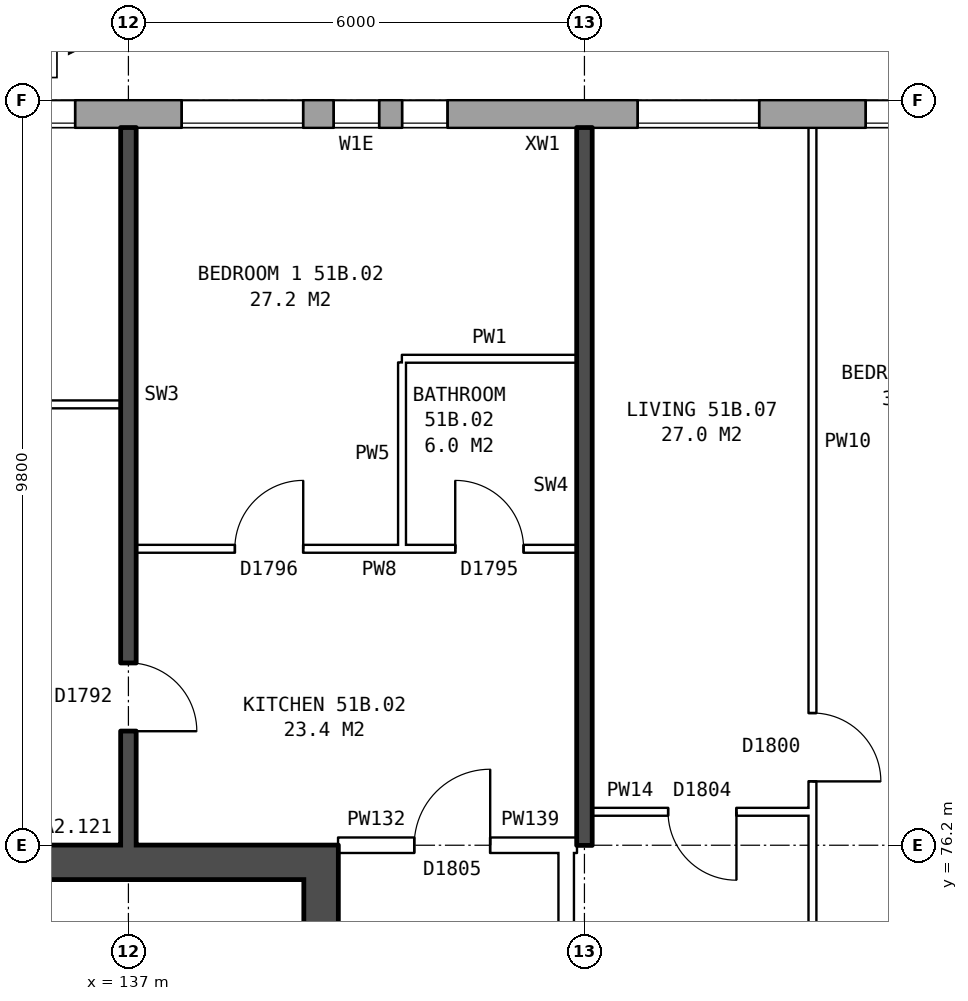
"""IFC4 building model, lengths in metres.
Left out: names, types, materials, properties, quantities, classifications, styles, units other than length and angle.
Written with IfcOpenShell. Run it as: python <this file> out.ifc"""

import sys

from ifc_helpers import new_model, si_unit, direction, frame, frame_2d, origin, place, context, subcontext, project, spatial, rectangle, extrude, element, fill, save


model = new_model("IFC4")
c1 = context("Model", 3, precision=1e-05, world=origin(), true_north=direction((0.0, 1.0)))
c2 = subcontext(c1, "Body", "Model", "MODEL_VIEW")
j1 = project(units=[si_unit("LENGTHUNIT", "METRE"), si_unit("PLANEANGLEUNIT", "RADIAN")], contexts=[c1])
p1 = place(None, origin())
s1 = spatial("IfcSite", under=j1, at=p1, CompositionType="ELEMENT")
p2 = place(p1, origin())
s2 = spatial("IfcBuilding", under=s1, at=p2, CompositionType="ELEMENT")
p3 = place(p2, frame((0.0, 0.0, 182.0)))
s3 = spatial("IfcBuildingStorey", under=s2, at=p3, CompositionType="ELEMENT", Elevation=182.0)
p4 = place(p3, frame((167.175, 85.82, 0.0), z_axis=(0.0, 0.0, 1.0), x_axis=(-1.0, 0.0, 0.0)))
e1 = element("IfcWall", 1, at=p4, inside=s3, PredefinedType="STANDARD", context=c2, shape_type="SweptSolid", body=[
    extrude(rectangle(XDim=33.101, YDim=0.36, at=frame_2d((16.55, 0.0))), origin(), (0.0, 0.0, 1.0), 2.85),
])
p5 = place(p4, frame((0.875, 0.0, 0.8)))
e2 = element("IfcOpeningElement", 2, at=p5, cuts=e1, PredefinedType="OPENING", context=c2, shape_type="SweptSolid", body=[
    extrude(rectangle(XDim=1.6, YDim=1.8, at=frame_2d((0.8, 0.9))), frame((0.0, 0.19, 0.0), z_axis=(0.0, -1.0, 0.0), x_axis=(1.0, 0.0, 0.0)), (0.0, 0.0, 1.0), 0.38),
])
p6 = place(p4, frame((3.875, 0.0, 0.8)))
e3 = element("IfcOpeningElement", 3, at=p6, cuts=e1, PredefinedType="OPENING", context=c2, shape_type="SweptSolid", body=[
    extrude(rectangle(XDim=1.6, YDim=1.8, at=frame_2d((0.8, 0.9))), frame((0.0, 0.19, 0.0), z_axis=(0.0, -1.0, 0.0), x_axis=(1.0, 0.0, 0.0)), (0.0, 0.0, 1.0), 0.38),
])
p7 = place(p4, frame((6.375, 0.0, 1.5)))
e4 = element("IfcOpeningElement", 4, at=p7, cuts=e1, PredefinedType="OPENING", context=c2, shape_type="SweptSolid", body=[
    extrude(rectangle(XDim=0.6, YDim=0.9, at=frame_2d((0.3, 0.45))), frame((0.0, 0.19, 0.0), z_axis=(0.0, -1.0, 0.0), x_axis=(1.0, 0.0, 0.0)), (0.0, 0.0, 1.0), 0.38),
])
p8 = place(p4, frame((9.875, 0.0, 0.8)))
e5 = element("IfcOpeningElement", 5, at=p8, cuts=e1, PredefinedType="OPENING", context=c2, shape_type="SweptSolid", body=[
    extrude(rectangle(XDim=1.6, YDim=1.8, at=frame_2d((0.8, 0.9))), frame((0.0, 0.19, 0.0), z_axis=(0.0, -1.0, 0.0), x_axis=(1.0, 0.0, 0.0)), (0.0, 0.0, 1.0), 0.38),
])
p9 = place(p4, frame((12.875, 0.0, 0.8)))
e6 = element("IfcOpeningElement", 6, at=p9, cuts=e1, PredefinedType="OPENING", context=c2, shape_type="SweptSolid", body=[
    extrude(rectangle(XDim=1.6, YDim=1.8, at=frame_2d((0.8, 0.9))), frame((0.0, 0.19, 0.0), z_axis=(0.0, -1.0, 0.0), x_axis=(1.0, 0.0, 0.0)), (0.0, 0.0, 1.0), 0.38),
])
p10 = place(p4, frame((15.875, 0.0, 0.8)))
e7 = element("IfcOpeningElement", 7, at=p10, cuts=e1, PredefinedType="OPENING", context=c2, shape_type="SweptSolid", body=[
    extrude(rectangle(XDim=1.6, YDim=1.8, at=frame_2d((0.8, 0.9))), frame((0.0, 0.19, 0.0), z_axis=(0.0, -1.0, 0.0), x_axis=(1.0, 0.0, 0.0)), (0.0, 0.0, 1.0), 0.38),
])
p11 = place(p4, frame((18.875, 0.0, 0.8)))
e8 = element("IfcOpeningElement", 8, at=p11, cuts=e1, PredefinedType="OPENING", context=c2, shape_type="SweptSolid", body=[
    extrude(rectangle(XDim=1.6, YDim=1.8, at=frame_2d((0.8, 0.9))), frame((0.0, 0.19, 0.0), z_axis=(0.0, -1.0, 0.0), x_axis=(1.0, 0.0, 0.0)), (0.0, 0.0, 1.0), 0.38),
])
p12 = place(p4, frame((21.875, 0.0, 0.8)))
e9 = element("IfcOpeningElement", 9, at=p12, cuts=e1, PredefinedType="OPENING", context=c2, shape_type="SweptSolid", body=[
    extrude(rectangle(XDim=1.6, YDim=1.8, at=frame_2d((0.8, 0.9))), frame((0.0, 0.19, 0.0), z_axis=(0.0, -1.0, 0.0), x_axis=(1.0, 0.0, 0.0)), (0.0, 0.0, 1.0), 0.38),
])
p13 = place(p4, frame((25.975, 0.0, 1.7)))
e10 = element("IfcOpeningElement", 10, at=p13, cuts=e1, PredefinedType="OPENING", context=c2, shape_type="SweptSolid", body=[
    extrude(rectangle(XDim=0.6, YDim=0.9, at=frame_2d((0.3, 0.45))), frame((0.0, 0.19, 0.0), z_axis=(0.0, -1.0, 0.0), x_axis=(1.0, 0.0, 0.0)), (0.0, 0.0, 1.0), 0.38),
])
p14 = place(p4, frame((27.875, 0.0, 0.8)))
e11 = element("IfcOpeningElement", 11, at=p14, cuts=e1, PredefinedType="OPENING", context=c2, shape_type="SweptSolid", body=[
    extrude(rectangle(XDim=1.6, YDim=1.8, at=frame_2d((0.8, 0.9))), frame((0.0, 0.19, 0.0), z_axis=(0.0, -1.0, 0.0), x_axis=(1.0, 0.0, 0.0)), (0.0, 0.0, 1.0), 0.38),
])
p15 = place(p4, frame((30.875, 0.0, 0.8)))
e12 = element("IfcOpeningElement", 12, at=p15, cuts=e1, PredefinedType="OPENING", context=c2, shape_type="SweptSolid", body=[
    extrude(rectangle(XDim=1.6, YDim=1.8, at=frame_2d((0.8, 0.9))), frame((0.0, 0.19, 0.0), z_axis=(0.0, -1.0, 0.0), x_axis=(1.0, 0.0, 0.0)), (0.0, 0.0, 1.0), 0.38),
])
p16 = place(p4, frame((8.175, 0.0, 0.8)))
e13 = element("IfcOpeningElement", 13, at=p16, cuts=e1, PredefinedType="OPENING", context=c2, shape_type="SweptSolid", body=[
    extrude(rectangle(XDim=1.4, YDim=0.9, at=frame_2d((0.7, 0.45))), frame((0.0, 0.19, 0.0), z_axis=(0.0, -1.0, 0.0), x_axis=(1.0, 0.0, 0.0)), (0.0, 0.0, 1.0), 0.38),
])
p17 = place(p4, frame((26.875, 0.0, 0.8)))
e14 = element("IfcOpeningElement", 14, at=p17, cuts=e1, PredefinedType="OPENING", context=c2, shape_type="SweptSolid", body=[
    extrude(rectangle(XDim=0.6, YDim=1.8, at=frame_2d((0.3, 0.9))), frame((0.0, 0.19, 0.0), z_axis=(0.0, -1.0, 0.0), x_axis=(1.0, 0.0, 0.0)), (0.0, 0.0, 1.0), 0.38),
])
p18 = place(p3, frame((139.535, 63.8, 0.0), z_axis=(0.0, 0.0, 1.0), x_axis=(0.0, 1.0, 0.0)))
e15 = element("IfcWall", 15, at=p18, inside=s3, PredefinedType="SHEAR", context=c2, shape_type="SweptSolid", body=[
    extrude(rectangle(XDim=12.4, YDim=0.45, at=frame_2d((6.2, 0.0))), origin(), (0.0, 0.0, 1.0), 2.85),
])
p19 = place(p18, frame((1.325, 0.0, 0.0)))
e16 = element("IfcOpeningElement", 16, at=p19, cuts=e15, PredefinedType="OPENING", context=c2, shape_type="SweptSolid", body=[
    extrude(rectangle(XDim=1.1, YDim=2.1, at=frame_2d((0.55, 1.05))), frame((0.0, 0.235, 0.0), z_axis=(0.0, -1.0, 0.0), x_axis=(1.0, 0.0, 0.0)), (0.0, 0.0, 1.0), 0.47),
])
p20 = place(p18, frame((3.6, 0.0, 0.0)))
e17 = element("IfcOpeningElement", 17, at=p20, cuts=e15, PredefinedType="OPENING", context=c2, shape_type="SweptSolid", body=[
    extrude(rectangle(XDim=1.1, YDim=2.1, at=frame_2d((0.55, 1.05))), frame((0.0, 0.235, 0.0), z_axis=(0.0, -1.0, 0.0), x_axis=(1.0, 0.0, 0.0)), (0.0, 0.0, 1.0), 0.47),
])
p21 = place(p18, frame((5.8, 0.0, 0.0)))
e18 = element("IfcOpeningElement", 18, at=p21, cuts=e15, PredefinedType="OPENING", context=c2, shape_type="SweptSolid", body=[
    extrude(rectangle(XDim=1.1, YDim=2.1, at=frame_2d((0.55, 1.05))), frame((0.0, 0.235, 0.0), z_axis=(0.0, -1.0, 0.0), x_axis=(1.0, 0.0, 0.0)), (0.0, 0.0, 1.0), 0.47),
])
p22 = place(p18, frame((9.9, 0.0, 0.0)))
e19 = element("IfcOpeningElement", 19, at=p22, cuts=e15, PredefinedType="OPENING", context=c2, shape_type="SweptSolid", body=[
    extrude(rectangle(XDim=1.1, YDim=2.1, at=frame_2d((0.55, 1.05))), frame((0.0, 0.235, 0.0), z_axis=(0.0, -1.0, 0.0), x_axis=(1.0, 0.0, 0.0)), (0.0, 0.0, 1.0), 0.47),
])
p23 = place(p18, frame((8.125, 0.0, 0.0)))
e20 = element("IfcOpeningElement", 20, at=p23, cuts=e15, PredefinedType="OPENING", context=c2, shape_type="SweptSolid", body=[
    extrude(rectangle(XDim=0.85, YDim=2.1, at=frame_2d((0.425, 1.05))), frame((0.0, 0.235, 0.0), z_axis=(0.0, -1.0, 0.0), x_axis=(1.0, 0.0, 0.0)), (0.0, 0.0, 1.0), 0.47),
])
p24 = place(p3, frame((139.31, 75.975, 0.0), z_axis=(0.0, 0.0, 1.0), x_axis=(-1.0, 0.0, 0.0)))
e21 = element("IfcWall", 21, at=p24, inside=s3, PredefinedType="SHEAR", context=c2, shape_type="SweptSolid", body=[
    extrude(rectangle(XDim=7.5, YDim=0.45, at=frame_2d((3.75, 0.0))), origin(), (0.0, 0.0, 1.0), 2.85),
])
p25 = place(p3, frame((142.76, 63.9, 0.0), z_axis=(0.0, 0.0, 1.0), x_axis=(0.0, 1.0, 0.0)))
e22 = element("IfcWall", 22, at=p25, inside=s3, PredefinedType="PARTITIONING", context=c2, shape_type="SweptSolid", body=[
    extrude(rectangle(XDim=12.2, YDim=0.2, at=frame_2d((6.1, 0.0))), origin(), (0.0, 0.0, 1.0), 2.85),
])
p26 = place(p25, frame((5.1, 0.0, 0.0)))
e23 = element("IfcOpeningElement", 23, at=p26, cuts=e22, PredefinedType="OPENING", context=c2, shape_type="SweptSolid", body=[
    extrude(rectangle(XDim=2.0, YDim=2.1, at=frame_2d((1.0, 1.05))), frame((0.0, 0.11, 0.0), z_axis=(0.0, -1.0, 0.0), x_axis=(1.0, 0.0, 0.0)), (0.0, 0.0, 1.0), 0.22),
])
p27 = place(p3, frame((139.76, 76.2, 0.0), z_axis=(0.0, 0.0, 1.0), x_axis=(1.0, 0.0, 0.0)))
e24 = element("IfcWall", 24, at=p27, inside=s3, PredefinedType="PARTITIONING", context=c2, shape_type="SweptSolid", body=[
    extrude(rectangle(XDim=3.0, YDim=0.2, at=frame_2d((1.5, 0.0))), origin(), (0.0, 0.0, 1.0), 2.85),
])
p28 = place(p27, frame((1.0, 0.0, 0.0)))
e25 = element("IfcOpeningElement", 25, at=p28, cuts=e24, PredefinedType="OPENING", context=c2, shape_type="SweptSolid", body=[
    extrude(rectangle(XDim=1.0, YDim=2.1, at=frame_2d((0.5, 1.05))), frame((0.0, 0.11, 0.0), z_axis=(0.0, -1.0, 0.0), x_axis=(1.0, 0.0, 0.0)), (0.0, 0.0, 1.0), 0.22),
])
p29 = place(p3, frame((142.76, 76.2, 0.0), z_axis=(0.0, 0.0, 1.0), x_axis=(1.0, 0.0, 0.0)))
e26 = element("IfcWall", 26, at=p29, inside=s3, PredefinedType="PARTITIONING", context=c2, shape_type="SweptSolid", body=[
    extrude(rectangle(XDim=0.14, YDim=0.2, at=frame_2d((0.07, 0.0))), origin(), (0.0, 0.0, 1.0), 2.85),
])
p30 = place(p3, frame((143.1, 76.64, 0.0), z_axis=(0.0, 0.0, 1.0), x_axis=(1.0, 0.0, 0.0)))
e27 = element("IfcWall", 27, at=p30, inside=s3, PredefinedType="PARTITIONING", context=c2, shape_type="SweptSolid", body=[
    extrude(rectangle(XDim=2.9, YDim=0.1, at=frame_2d((1.45, 0.0))), origin(), (0.0, 0.0, 1.0), 2.85),
])
p31 = place(p30, frame((1.0, 0.0, 0.0)))
e28 = element("IfcOpeningElement", 28, at=p31, cuts=e27, PredefinedType="OPENING", context=c2, shape_type="SweptSolid", body=[
    extrude(rectangle(XDim=0.9, YDim=2.1, at=frame_2d((0.45, 1.05))), frame((0.0, 0.06, 0.0), z_axis=(0.0, -1.0, 0.0), x_axis=(1.0, 0.0, 0.0)), (0.0, 0.0, 1.0), 0.12),
])
p32 = place(p3, frame((137.1, 80.1, 0.0), z_axis=(0.0, 0.0, 1.0), x_axis=(1.0, 0.0, 0.0)))
e29 = element("IfcWall", 29, at=p32, inside=s3, PredefinedType="PARTITIONING", context=c2, shape_type="SweptSolid", body=[
    extrude(rectangle(XDim=5.8, YDim=0.1, at=frame_2d((2.9, 0.0))), origin(), (0.0, 0.0, 1.0), 2.85),
])
p33 = place(p32, frame((1.3, 0.0, 0.0)))
e30 = element("IfcOpeningElement", 30, at=p33, cuts=e29, PredefinedType="OPENING", context=c2, shape_type="SweptSolid", body=[
    extrude(rectangle(XDim=0.9, YDim=2.1, at=frame_2d((0.45, 1.05))), frame((0.0, 0.06, 0.0), z_axis=(0.0, -1.0, 0.0), x_axis=(1.0, 0.0, 0.0)), (0.0, 0.0, 1.0), 0.12),
])
p34 = place(p32, frame((4.2, 0.0, 0.0)))
e31 = element("IfcOpeningElement", 31, at=p34, cuts=e29, PredefinedType="OPENING", context=c2, shape_type="SweptSolid", body=[
    extrude(rectangle(XDim=0.9, YDim=2.1, at=frame_2d((0.45, 1.05))), frame((0.0, 0.06, 0.0), z_axis=(0.0, -1.0, 0.0), x_axis=(1.0, 0.0, 0.0)), (0.0, 0.0, 1.0), 0.12),
])
p35 = place(p3, frame((131.36, 82.0, 0.0), z_axis=(0.0, 0.0, 1.0), x_axis=(1.0, 0.0, 0.0)))
e32 = element("IfcWall", 32, at=p35, inside=s3, PredefinedType="PARTITIONING", context=c2, shape_type="SweptSolid", body=[
    extrude(rectangle(XDim=5.54, YDim=0.1, at=frame_2d((2.77, 0.0))), origin(), (0.0, 0.0, 1.0), 2.85),
])
p36 = place(p35, frame((2.32, 0.0, 0.0)))
e33 = element("IfcOpeningElement", 33, at=p36, cuts=e32, PredefinedType="OPENING", context=c2, shape_type="SweptSolid", body=[
    extrude(rectangle(XDim=0.9, YDim=2.1, at=frame_2d((0.45, 1.05))), frame((0.0, 0.06, 0.0), z_axis=(0.0, -1.0, 0.0), x_axis=(1.0, 0.0, 0.0)), (0.0, 0.0, 1.0), 0.12),
])
p37 = place(p3, frame((140.6, 82.6, 0.0), z_axis=(0.0, 0.0, 1.0), x_axis=(1.0, 0.0, 0.0)))
e34 = element("IfcWall", 34, at=p37, inside=s3, PredefinedType="PARTITIONING", context=c2, shape_type="SweptSolid", body=[
    extrude(rectangle(XDim=2.3, YDim=0.1, at=frame_2d((1.15, 0.0))), origin(), (0.0, 0.0, 1.0), 2.85),
])
p38 = place(p3, frame((137.0, 76.2, 0.0), z_axis=(0.0, 0.0, 1.0), x_axis=(0.0, 1.0, 0.0)))
e35 = element("IfcWall", 35, at=p38, inside=s3, PredefinedType="SOLIDWALL", context=c2, shape_type="SweptSolid", body=[
    extrude(rectangle(XDim=9.44, YDim=0.2, at=frame_2d((4.72, 0.0))), origin(), (0.0, 0.0, 1.0), 2.85),
])
p39 = place(p38, frame((1.5, 0.0, 0.0)))
e36 = element("IfcOpeningElement", 36, at=p39, cuts=e35, PredefinedType="OPENING", context=c2, shape_type="SweptSolid", body=[
    extrude(rectangle(XDim=0.9, YDim=2.1, at=frame_2d((0.45, 1.05))), frame((0.0, 0.11, 0.0), z_axis=(0.0, -1.0, 0.0), x_axis=(1.0, 0.0, 0.0)), (0.0, 0.0, 1.0), 0.22),
])
p40 = place(p3, frame((140.6, 80.15, 0.0), z_axis=(0.0, 0.0, 1.0), x_axis=(0.0, 1.0, 0.0)))
e37 = element("IfcWall", 37, at=p40, inside=s3, PredefinedType="PARTITIONING", context=c2, shape_type="SweptSolid", body=[
    extrude(rectangle(XDim=2.4, YDim=0.1, at=frame_2d((1.2, 0.0))), origin(), (0.0, 0.0, 1.0), 2.85),
])
p41 = place(p3, frame((143.0, 76.2, 0.0), z_axis=(0.0, 0.0, 1.0), x_axis=(0.0, 1.0, 0.0)))
e38 = element("IfcWall", 38, at=p41, inside=s3, PredefinedType="SOLIDWALL", context=c2, shape_type="SweptSolid", body=[
    extrude(rectangle(XDim=9.44, YDim=0.2, at=frame_2d((4.72, 0.0))), origin(), (0.0, 0.0, 1.0), 2.85),
])
p42 = place(p3, frame((146.0, 71.3, 0.0), z_axis=(0.0, 0.0, 1.0), x_axis=(0.0, 1.0, 0.0)))
e39 = element("IfcWall", 39, at=p42, inside=s3, PredefinedType="PARTITIONING", context=c2, shape_type="SweptSolid", body=[
    extrude(rectangle(XDim=14.34, YDim=0.1, at=frame_2d((7.17, 0.0))), origin(), (0.0, 0.0, 1.0), 2.85),
])
p43 = place(p42, frame((5.74, 0.0, 0.0)))
e40 = element("IfcOpeningElement", 40, at=p43, cuts=e39, PredefinedType="OPENING", context=c2, shape_type="SweptSolid", body=[
    extrude(rectangle(XDim=0.9, YDim=2.1, at=frame_2d((0.45, 1.05))), frame((0.0, 0.06, 0.0), z_axis=(0.0, -1.0, 0.0), x_axis=(1.0, 0.0, 0.0)), (0.0, 0.0, 1.0), 0.12),
])
p44 = place(p42, frame((0.4, 0.0, 0.0)))
e41 = element("IfcOpeningElement", 41, at=p44, cuts=e39, PredefinedType="OPENING", context=c2, shape_type="SweptSolid", body=[
    extrude(rectangle(XDim=0.9, YDim=2.1, at=frame_2d((0.45, 1.05))), frame((0.0, 0.06, 0.0), z_axis=(0.0, -1.0, 0.0), x_axis=(1.0, 0.0, 0.0)), (0.0, 0.0, 1.0), 0.12),
])
p45 = place(p11, origin())
e42 = element("IfcWindow", 42, at=p45, inside=s3, PartitioningType="SINGLE_PANEL", PredefinedType="WINDOW", context=c2, shape_type="SweptSolid", body=[
    extrude(rectangle(XDim=1.6, YDim=1.8, at=frame_2d((0.8, 0.9))), frame((0.0, 0.15, 0.0), z_axis=(0.0, -1.0, 0.0), x_axis=(1.0, 0.0, 0.0)), (0.0, 0.0, 1.0), 0.06),
])
fill(e8, e42)
p46 = place(p12, origin())
e43 = element("IfcWindow", 43, at=p46, inside=s3, PartitioningType="SINGLE_PANEL", PredefinedType="WINDOW", context=c2, shape_type="SweptSolid", body=[
    extrude(rectangle(XDim=1.6, YDim=1.8, at=frame_2d((0.8, 0.9))), frame((0.0, 0.15, 0.0), z_axis=(0.0, -1.0, 0.0), x_axis=(1.0, 0.0, 0.0)), (0.0, 0.0, 1.0), 0.06),
])
fill(e9, e43)
p47 = place(p13, origin())
e44 = element("IfcWindow", 44, at=p47, inside=s3, PartitioningType="SINGLE_PANEL", PredefinedType="WINDOW", context=c2, shape_type="SweptSolid", body=[
    extrude(rectangle(XDim=0.6, YDim=0.9, at=frame_2d((0.3, 0.45))), frame((0.0, 0.15, 0.0), z_axis=(0.0, -1.0, 0.0), x_axis=(1.0, 0.0, 0.0)), (0.0, 0.0, 1.0), 0.06),
])
fill(e10, e44)
p48 = place(p14, origin())
e45 = element("IfcWindow", 45, at=p48, inside=s3, PartitioningType="SINGLE_PANEL", PredefinedType="WINDOW", context=c2, shape_type="SweptSolid", body=[
    extrude(rectangle(XDim=1.6, YDim=1.8, at=frame_2d((0.8, 0.9))), frame((0.0, 0.15, 0.0), z_axis=(0.0, -1.0, 0.0), x_axis=(1.0, 0.0, 0.0)), (0.0, 0.0, 1.0), 0.06),
])
fill(e11, e45)
p49 = place(p15, origin())
e46 = element("IfcWindow", 46, at=p49, inside=s3, PartitioningType="SINGLE_PANEL", PredefinedType="WINDOW", context=c2, shape_type="SweptSolid", body=[
    extrude(rectangle(XDim=1.6, YDim=1.8, at=frame_2d((0.8, 0.9))), frame((0.0, 0.15, 0.0), z_axis=(0.0, -1.0, 0.0), x_axis=(1.0, 0.0, 0.0)), (0.0, 0.0, 1.0), 0.06),
])
fill(e12, e46)
p50 = place(p33, origin())
e47 = element("IfcDoor", 47, at=p50, inside=s3, OperationType="SINGLE_SWING_RIGHT", PredefinedType="DOOR", context=c2, shape_type="SweptSolid", body=[
    extrude(rectangle(XDim=0.9, YDim=2.1, at=frame_2d((0.45, 1.05))), frame((0.0, 0.025, 0.0), z_axis=(0.0, -1.0, 0.0), x_axis=(1.0, 0.0, 0.0)), (0.0, 0.0, 1.0), 0.05),
])
fill(e30, e47)
p51 = place(p28, origin())
e48 = element("IfcDoor", 48, at=p51, inside=s3, OperationType="SINGLE_SWING_RIGHT", PredefinedType="DOOR", context=c2, shape_type="SweptSolid", body=[
    extrude(rectangle(XDim=1.0, YDim=2.1, at=frame_2d((0.5, 1.05))), frame((0.0, 0.025, 0.0), z_axis=(0.0, -1.0, 0.0), x_axis=(1.0, 0.0, 0.0)), (0.0, 0.0, 1.0), 0.05),
])
fill(e25, e48)
p52 = place(p39, frame((0.9, 0.0, 0.0), z_axis=(0.0, 0.0, 1.0), x_axis=(-1.0, 0.0, 0.0)))
e49 = element("IfcDoor", 49, at=p52, inside=s3, OperationType="SINGLE_SWING_RIGHT", PredefinedType="DOOR", context=c2, shape_type="SweptSolid", body=[
    extrude(rectangle(XDim=0.9, YDim=2.1, at=frame_2d((0.45, 1.05))), frame((0.0, 0.025, 0.0), z_axis=(0.0, -1.0, 0.0), x_axis=(1.0, 0.0, 0.0)), (0.0, 0.0, 1.0), 0.05),
])
fill(e36, e49)
p53 = place(p34, origin())
e50 = element("IfcDoor", 50, at=p53, inside=s3, OperationType="SINGLE_SWING_LEFT", PredefinedType="DOOR", context=c2, shape_type="SweptSolid", body=[
    extrude(rectangle(XDim=0.9, YDim=2.1, at=frame_2d((0.45, 1.05))), frame((0.0, 0.025, 0.0), z_axis=(0.0, -1.0, 0.0), x_axis=(1.0, 0.0, 0.0)), (0.0, 0.0, 1.0), 0.05),
])
fill(e31, e50)
p54 = place(p43, frame((0.9, 0.0, 0.0), z_axis=(0.0, 0.0, 1.0), x_axis=(-1.0, 0.0, 0.0)))
e51 = element("IfcDoor", 51, at=p54, inside=s3, OperationType="SINGLE_SWING_RIGHT", PredefinedType="DOOR", context=c2, shape_type="SweptSolid", body=[
    extrude(rectangle(XDim=0.9, YDim=2.1, at=frame_2d((0.45, 1.05))), frame((0.0, 0.025, 0.0), z_axis=(0.0, -1.0, 0.0), x_axis=(1.0, 0.0, 0.0)), (0.0, 0.0, 1.0), 0.05),
])
fill(e40, e51)
p55 = place(p31, frame((0.9, 0.0, 0.0), z_axis=(0.0, 0.0, 1.0), x_axis=(-1.0, 0.0, 0.0)))
e52 = element("IfcDoor", 52, at=p55, inside=s3, OperationType="SINGLE_SWING_LEFT", PredefinedType="DOOR", context=c2, shape_type="SweptSolid", body=[
    extrude(rectangle(XDim=0.9, YDim=2.1, at=frame_2d((0.45, 1.05))), frame((0.0, 0.025, 0.0), z_axis=(0.0, -1.0, 0.0), x_axis=(1.0, 0.0, 0.0)), (0.0, 0.0, 1.0), 0.05),
])
fill(e28, e52)
p56 = place(p17, origin())
e53 = element("IfcWindow", 53, at=p56, inside=s3, PartitioningType="SINGLE_PANEL", PredefinedType="WINDOW", context=c2, shape_type="SweptSolid", body=[
    extrude(rectangle(XDim=0.6, YDim=1.8, at=frame_2d((0.3, 0.9))), frame((0.0, 0.15, 0.0), z_axis=(0.0, -1.0, 0.0), x_axis=(1.0, 0.0, 0.0)), (0.0, 0.0, 1.0), 0.06),
])
fill(e14, e53)
save(model, sys.argv[1])
